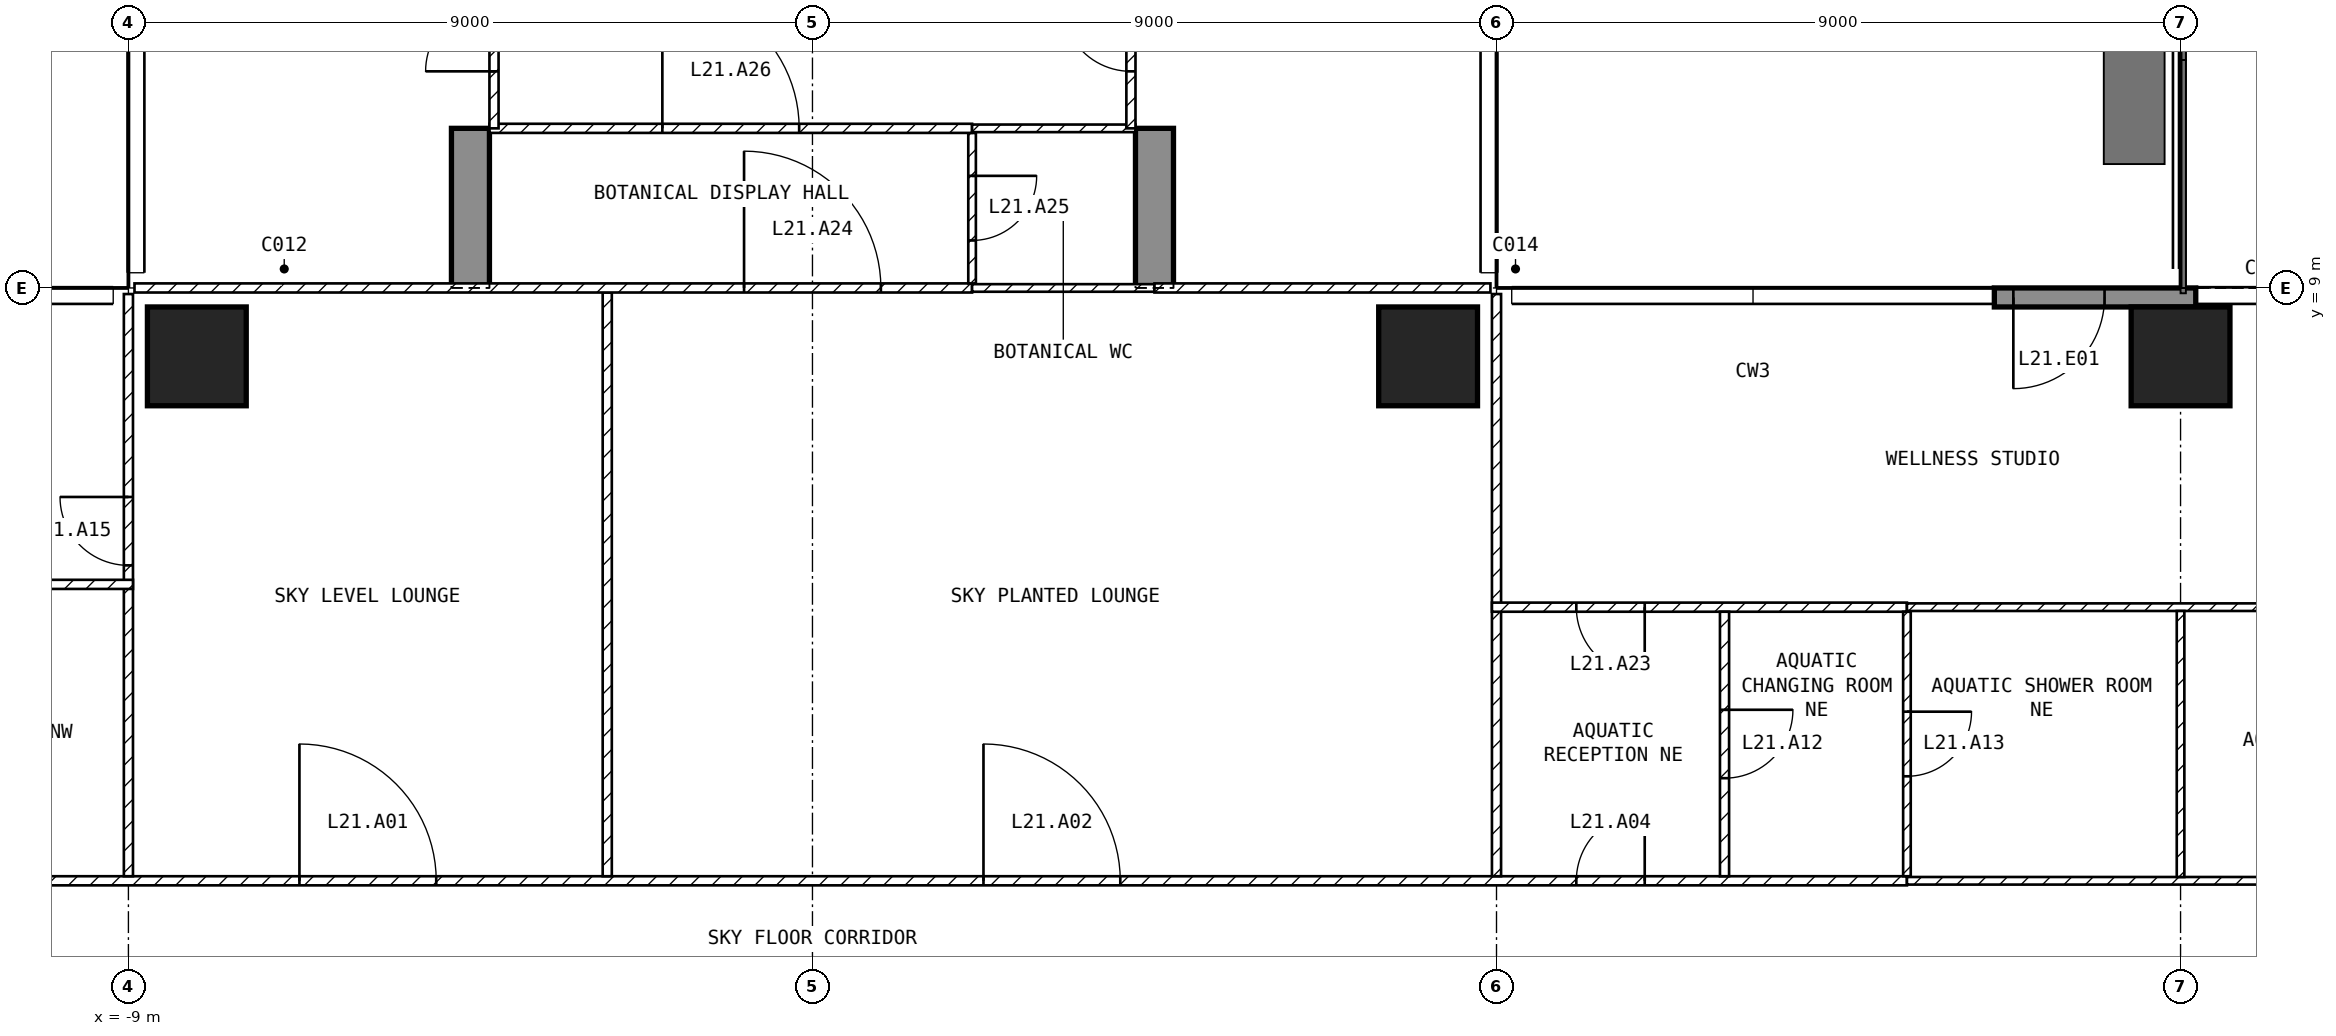
"""IFC4 building model, lengths in metres.
Left out: names, types, materials, properties, quantities, classifications, styles, units other than length and angle.
Written with IfcOpenShell. Run it as: python <this file> out.ifc"""

import sys

from ifc_helpers import new_model, si_unit, direction, frame, frame_2d, origin, origin_2d, place, context, subcontext, project, spatial, polyline, rectangle, outline, extrude, element, fill, save


model = new_model("IFC4")
c1 = context("Model", 3, precision=1e-05, world=origin(), true_north=direction((0.0, 1.0)))
c2 = subcontext(c1, "Body", "Model", "MODEL_VIEW")
j1 = project(units=[si_unit("LENGTHUNIT", "METRE"), si_unit("PLANEANGLEUNIT", "RADIAN")], contexts=[c1])
p1 = place(None, origin())
s1 = spatial("IfcSite", under=j1, at=p1, CompositionType="ELEMENT")
p2 = place(p1, origin())
s2 = spatial("IfcBuilding", under=s1, at=p2, CompositionType="ELEMENT")
p3 = place(p2, frame((0.0, 0.0, 92.5)))
s3 = spatial("IfcBuildingStorey", under=s2, at=p3, CompositionType="ELEMENT", Elevation=92.5)
for number, where, z_axis, x_axis in (
    (1, (-8.1, 8.1, -0.3), (0.0, 0.0, 1.0), (1.0, 0.0, 0.0)),
    (2, (8.1, 8.1, -0.3), (0.0, 0.0, 1.0), (1.0, 0.0, 0.0)),
    (3, (18.0, 8.1, -0.3), (0.0, 0.0, 1.0), (1.0, 0.0, 0.0)),
):
    element("IfcColumn", number, at=place(p3, frame(where, z_axis=z_axis, x_axis=x_axis)), inside=s3, PredefinedType="COLUMN", context=c2, shape_type="SweptSolid", body=[
        extrude(rectangle(XDim=1.3, YDim=1.3, at=origin_2d()), origin(), (0.0, 0.0, 1.0), 5.25),
    ])
for number, where, z_axis, x_axis in (
    (4, (-4.75, 9.0, -0.3), (1.0, 0.0, 0.0), (0.0, 1.0, 0.0)),
    (5, (4.25, 9.0, -0.3), (1.0, 0.0, 0.0), (0.0, 1.0, 0.0)),
):
    element("IfcWall", number, at=place(p3, frame(where, z_axis=z_axis, x_axis=x_axis)), inside=s3, PredefinedType="SHEAR", context=c2, shape_type="SweptSolid", body=[
        extrude(outline(polyline([(0.0, 0.0), (2.1, 0.0), (2.1, 2.7), (4.5, 2.7), (4.5, 0.0), (9.9, 0.0), (9.9, 2.7), (12.3, 2.7), (12.3, 0.0), (16.45, 0.0), (16.45, 5.25), (0.0, 5.25), (0.0, 0.0)])), origin(), (0.0, 0.0, 1.0), 0.5),
    ])
p4 = place(p3, frame((18.2, 8.875, 0.0), z_axis=(0.0, 0.0, 1.0), x_axis=(-1.0, 0.0, 0.0)))
e6 = element("IfcWall", 6, at=p4, inside=s3, PredefinedType="SOLIDWALL", context=c2, shape_type="SweptSolid", body=[
    extrude(rectangle(XDim=2.65, YDim=0.25, at=frame_2d((1.325, 0.0))), origin(), (0.0, 0.0, 1.0), 4.95),
])
p5 = place(p4, frame((1.2, 0.0, 0.0)))
e7 = element("IfcOpeningElement", 7, at=p5, cuts=e6, PredefinedType="OPENING", context=c2, shape_type="SweptSolid", body=[
    extrude(rectangle(XDim=1.2, YDim=2.4, at=frame_2d((0.6, 1.2))), frame((0.0, 0.135, 0.0), z_axis=(0.0, -1.0, 0.0), x_axis=(1.0, 0.0, 0.0)), (0.0, 0.0, 1.0), 0.27),
])
p6 = place(p3, frame((-18.3, 1.2, 0.0), z_axis=(0.0, 0.0, 1.0), x_axis=(1.0, 0.0, 0.0)))
e8 = element("IfcWall", 8, at=p6, inside=s3, PredefinedType="PARTITIONING", context=c2, shape_type="SweptSolid", body=[
    extrude(rectangle(XDim=32.7, YDim=0.12, at=frame_2d((16.35, 0.0))), origin(), (0.0, 0.0, 1.0), 4.95),
])
p7 = place(p6, frame((11.55, 0.0, 0.0)))
e9 = element("IfcOpeningElement", 9, at=p7, cuts=e8, PredefinedType="OPENING", context=c2, shape_type="SweptSolid", body=[
    extrude(rectangle(XDim=1.8, YDim=2.1, at=frame_2d((0.9, 1.05))), frame((0.0, 0.07, 0.0), z_axis=(0.0, -1.0, 0.0), x_axis=(1.0, 0.0, 0.0)), (0.0, 0.0, 1.0), 0.14),
])
p8 = place(p6, frame((20.55, 0.0, 0.0)))
e10 = element("IfcOpeningElement", 10, at=p8, cuts=e8, PredefinedType="OPENING", context=c2, shape_type="SweptSolid", body=[
    extrude(rectangle(XDim=1.8, YDim=2.1, at=frame_2d((0.9, 1.05))), frame((0.0, 0.07, 0.0), z_axis=(0.0, -1.0, 0.0), x_axis=(1.0, 0.0, 0.0)), (0.0, 0.0, 1.0), 0.14),
])
p9 = place(p6, frame((28.35, 0.0, 0.0)))
e11 = element("IfcOpeningElement", 11, at=p9, cuts=e8, PredefinedType="OPENING", context=c2, shape_type="SweptSolid", body=[
    extrude(rectangle(XDim=0.9, YDim=2.1, at=frame_2d((0.45, 1.05))), frame((0.0, 0.07, 0.0), z_axis=(0.0, -1.0, 0.0), x_axis=(1.0, 0.0, 0.0)), (0.0, 0.0, 1.0), 0.14),
])
p10 = place(p6, frame((6.9, 0.0, 0.0)))
e12 = element("IfcOpeningElement", 12, at=p10, cuts=e8, PredefinedType="OPENING", context=c2, shape_type="SweptSolid", body=[
    extrude(rectangle(XDim=0.9, YDim=2.1, at=frame_2d((0.45, 1.05))), frame((0.0, 0.07, 0.0), z_axis=(0.0, -1.0, 0.0), x_axis=(1.0, 0.0, 0.0)), (0.0, 0.0, 1.0), 0.14),
])
p11 = place(p3, frame((14.4, 1.2, 0.0), z_axis=(0.0, 0.0, 1.0), x_axis=(1.0, 0.0, 0.0)))
e13 = element("IfcWall", 13, at=p11, inside=s3, PredefinedType="PARTITIONING", context=c2, shape_type="SweptSolid", body=[
    extrude(rectangle(XDim=7.2, YDim=0.1, at=frame_2d((3.6, 0.0))), origin(), (0.0, 0.0, 1.0), 4.95),
])
p12 = place(p11, frame((4.975, 0.0, 0.0)))
e14 = element("IfcOpeningElement", 14, at=p12, cuts=e13, PredefinedType="OPENING", context=c2, shape_type="SweptSolid", body=[
    extrude(rectangle(XDim=0.85, YDim=2.1, at=frame_2d((0.425, 1.05))), frame((0.0, 0.06, 0.0), z_axis=(0.0, -1.0, 0.0), x_axis=(1.0, 0.0, 0.0)), (0.0, 0.0, 1.0), 0.12),
])
p13 = place(p3, frame((-2.7, 8.94, 0.0), z_axis=(0.0, 0.0, 1.0), x_axis=(0.0, -1.0, 0.0)))
e15 = element("IfcWall", 15, at=p13, inside=s3, PredefinedType="PARTITIONING", context=c2, shape_type="SweptSolid", body=[
    extrude(rectangle(XDim=7.68, YDim=0.12, at=frame_2d((3.84, 0.0))), origin(), (0.0, 0.0, 1.0), 4.95),
])
p14 = place(p3, frame((-9.0, 1.26, 0.0), z_axis=(0.0, 0.0, 1.0), x_axis=(0.0, 1.0, 0.0)))
e16 = element("IfcWall", 16, at=p14, inside=s3, PredefinedType="PARTITIONING", context=c2, shape_type="SweptSolid", body=[
    extrude(rectangle(XDim=7.66, YDim=0.12, at=frame_2d((3.83, 0.0))), origin(), (0.0, 0.0, 1.0), 4.95),
])
p15 = place(p14, frame((4.09, 0.0, 0.0)))
e17 = element("IfcOpeningElement", 17, at=p15, cuts=e16, PredefinedType="OPENING", context=c2, shape_type="SweptSolid", body=[
    extrude(rectangle(XDim=0.9, YDim=2.1, at=frame_2d((0.45, 1.05))), frame((0.0, 0.07, 0.0), z_axis=(0.0, -1.0, 0.0), x_axis=(1.0, 0.0, 0.0)), (0.0, 0.0, 1.0), 0.14),
])
p16 = place(p3, frame((-8.92, 9.0, 0.0), z_axis=(0.0, 0.0, 1.0), x_axis=(1.0, 0.0, 0.0)))
e18 = element("IfcWall", 18, at=p16, inside=s3, PredefinedType="PARTITIONING", context=c2, shape_type="SweptSolid", body=[
    extrude(rectangle(XDim=11.02, YDim=0.12, at=frame_2d((5.51, 0.0))), origin(), (0.0, 0.0, 1.0), 4.95),
])
p17 = place(p16, frame((8.02, 0.0, 0.0)))
e19 = element("IfcOpeningElement", 19, at=p17, cuts=e18, PredefinedType="OPENING", context=c2, shape_type="SweptSolid", body=[
    extrude(rectangle(XDim=1.8, YDim=2.1, at=frame_2d((0.9, 1.05))), frame((0.0, 0.07, 0.0), z_axis=(0.0, -1.0, 0.0), x_axis=(1.0, 0.0, 0.0)), (0.0, 0.0, 1.0), 0.14),
])
p18 = place(p3, frame((9.0, 8.92, 0.0), z_axis=(0.0, 0.0, 1.0), x_axis=(0.0, -1.0, 0.0)))
e20 = element("IfcWall", 20, at=p18, inside=s3, PredefinedType="PARTITIONING", context=c2, shape_type="SweptSolid", body=[
    extrude(rectangle(XDim=7.66, YDim=0.12, at=frame_2d((3.83, 0.0))), origin(), (0.0, 0.0, 1.0), 4.95),
])
p19 = place(p3, frame((2.1, 9.0, 0.0), z_axis=(0.0, 0.0, 1.0), x_axis=(1.0, 0.0, 0.0)))
e21 = element("IfcWall", 21, at=p19, inside=s3, PredefinedType="PARTITIONING", context=c2, shape_type="SweptSolid", body=[
    extrude(rectangle(XDim=2.4, YDim=0.1, at=frame_2d((1.2, 0.0))), origin(), (0.0, 0.0, 1.0), 4.95),
])
p20 = place(p3, frame((4.5, 9.0, 0.0), z_axis=(0.0, 0.0, 1.0), x_axis=(1.0, 0.0, 0.0)))
e22 = element("IfcWall", 22, at=p20, inside=s3, PredefinedType="PARTITIONING", context=c2, shape_type="SweptSolid", body=[
    extrude(rectangle(XDim=4.42, YDim=0.12, at=frame_2d((2.21, 0.0))), origin(), (0.0, 0.0, 1.0), 4.95),
])
p21 = place(p3, frame((14.4, 4.8, 0.0), z_axis=(0.0, 0.0, 1.0), x_axis=(-1.0, 0.0, 0.0)))
e23 = element("IfcWall", 23, at=p21, inside=s3, PredefinedType="PARTITIONING", context=c2, shape_type="SweptSolid", body=[
    extrude(rectangle(XDim=5.46, YDim=0.12, at=frame_2d((2.73, 0.0))), origin(), (0.0, 0.0, 1.0), 4.95),
])
p22 = place(p21, frame((3.45, 0.0, 0.0)))
e24 = element("IfcOpeningElement", 24, at=p22, cuts=e23, PredefinedType="OPENING", context=c2, shape_type="SweptSolid", body=[
    extrude(rectangle(XDim=0.9, YDim=2.1, at=frame_2d((0.45, 1.05))), frame((0.0, 0.07, 0.0), z_axis=(0.0, -1.0, 0.0), x_axis=(1.0, 0.0, 0.0)), (0.0, 0.0, 1.0), 0.14),
])
p23 = place(p3, frame((21.6, 4.8, 0.0), z_axis=(0.0, 0.0, 1.0), x_axis=(-1.0, 0.0, 0.0)))
e25 = element("IfcWall", 25, at=p23, inside=s3, PredefinedType="PARTITIONING", context=c2, shape_type="SweptSolid", body=[
    extrude(rectangle(XDim=7.2, YDim=0.1, at=frame_2d((3.6, 0.0))), origin(), (0.0, 0.0, 1.0), 4.95),
])
p24 = place(p3, frame((12.0, 4.74, 0.0), z_axis=(0.0, 0.0, 1.0), x_axis=(0.0, -1.0, 0.0)))
e26 = element("IfcWall", 26, at=p24, inside=s3, PredefinedType="PARTITIONING", context=c2, shape_type="SweptSolid", body=[
    extrude(rectangle(XDim=3.48, YDim=0.12, at=frame_2d((1.74, 0.0))), origin(), (0.0, 0.0, 1.0), 4.95),
])
p25 = place(p24, frame((1.29, 0.0, 0.0)))
e27 = element("IfcOpeningElement", 27, at=p25, cuts=e26, PredefinedType="OPENING", context=c2, shape_type="SweptSolid", body=[
    extrude(rectangle(XDim=0.9, YDim=2.1, at=frame_2d((0.45, 1.05))), frame((0.0, 0.07, 0.0), z_axis=(0.0, -1.0, 0.0), x_axis=(1.0, 0.0, 0.0)), (0.0, 0.0, 1.0), 0.14),
])
p26 = place(p3, frame((14.4, 4.74, 0.0), z_axis=(0.0, 0.0, 1.0), x_axis=(0.0, -1.0, 0.0)))
e28 = element("IfcWall", 28, at=p26, inside=s3, PredefinedType="PARTITIONING", context=c2, shape_type="SweptSolid", body=[
    extrude(rectangle(XDim=3.48, YDim=0.1, at=frame_2d((1.74, 0.0))), origin(), (0.0, 0.0, 1.0), 4.95),
])
p27 = place(p26, frame((1.315, 0.0, 0.0)))
e29 = element("IfcOpeningElement", 29, at=p27, cuts=e28, PredefinedType="OPENING", context=c2, shape_type="SweptSolid", body=[
    extrude(rectangle(XDim=0.85, YDim=2.1, at=frame_2d((0.425, 1.05))), frame((0.0, 0.06, 0.0), z_axis=(0.0, -1.0, 0.0), x_axis=(1.0, 0.0, 0.0)), (0.0, 0.0, 1.0), 0.12),
])
p28 = place(p3, frame((18.0, 4.75, 0.0), z_axis=(0.0, 0.0, 1.0), x_axis=(0.0, -1.0, 0.0)))
e30 = element("IfcWall", 30, at=p28, inside=s3, PredefinedType="PARTITIONING", context=c2, shape_type="SweptSolid", body=[
    extrude(rectangle(XDim=3.5, YDim=0.1, at=frame_2d((1.75, 0.0))), origin(), (0.0, 0.0, 1.0), 4.046),
])
p29 = place(p3, frame((-8.94, 5.1, 0.0), z_axis=(0.0, 0.0, 1.0), x_axis=(-1.0, 0.0, 0.0)))
e31 = element("IfcWall", 31, at=p29, inside=s3, PredefinedType="PARTITIONING", context=c2, shape_type="SweptSolid", body=[
    extrude(rectangle(XDim=9.36, YDim=0.12, at=frame_2d((4.68, 0.0))), origin(), (0.0, 0.0, 1.0), 4.95),
])
p30 = place(p3, frame((2.1, 11.04, 0.0), z_axis=(0.0, 0.0, 1.0), x_axis=(0.0, -1.0, 0.0)))
e32 = element("IfcWall", 32, at=p30, inside=s3, PredefinedType="PARTITIONING", context=c2, shape_type="SweptSolid", body=[
    extrude(rectangle(XDim=1.98, YDim=0.1, at=frame_2d((0.99, 0.0))), origin(), (0.0, 0.0, 1.0), 4.95),
])
p31 = place(p30, frame((0.565, 0.0, 0.0)))
e33 = element("IfcOpeningElement", 33, at=p31, cuts=e32, PredefinedType="OPENING", context=c2, shape_type="SweptSolid", body=[
    extrude(rectangle(XDim=0.85, YDim=2.1, at=frame_2d((0.425, 1.05))), frame((0.0, 0.06, 0.0), z_axis=(0.0, -1.0, 0.0), x_axis=(1.0, 0.0, 0.0)), (0.0, 0.0, 1.0), 0.12),
])
p32 = place(p3, frame((-4.25, 11.1, 0.0), z_axis=(0.0, 0.0, 1.0), x_axis=(1.0, 0.0, 0.0)))
e34 = element("IfcWall", 34, at=p32, inside=s3, PredefinedType="PARTITIONING", context=c2, shape_type="SweptSolid", body=[
    extrude(rectangle(XDim=6.35, YDim=0.12, at=frame_2d((3.175, 0.0))), origin(), (0.0, 0.0, 1.0), 4.95),
])
p33 = place(p32, frame((2.275, 0.0, 0.0)))
e35 = element("IfcOpeningElement", 35, at=p33, cuts=e34, PredefinedType="OPENING", context=c2, shape_type="SweptSolid", body=[
    extrude(rectangle(XDim=1.8, YDim=2.1, at=frame_2d((0.9, 1.05))), frame((0.0, 0.07, 0.0), z_axis=(0.0, -1.0, 0.0), x_axis=(1.0, 0.0, 0.0)), (0.0, 0.0, 1.0), 0.14),
])
p34 = place(p3, frame((2.1, 11.1, 0.0), z_axis=(0.0, 0.0, 1.0), x_axis=(1.0, 0.0, 0.0)))
e36 = element("IfcWall", 36, at=p34, inside=s3, PredefinedType="PARTITIONING", context=c2, shape_type="SweptSolid", body=[
    extrude(rectangle(XDim=2.15, YDim=0.1, at=frame_2d((1.075, 0.0))), origin(), (0.0, 0.0, 1.0), 4.95),
])
p35 = place(p3, frame((4.19, 11.1, 0.0), z_axis=(0.0, 0.0, 1.0), x_axis=(0.0, 1.0, 0.0)))
e37 = element("IfcWall", 37, at=p35, inside=s3, PredefinedType="PARTITIONING", context=c2, shape_type="SweptSolid", body=[
    extrude(rectangle(XDim=2.4, YDim=0.12, at=frame_2d((1.2, 0.0))), origin(), (0.0, 0.0, 1.0), 2.4),
])
p36 = place(p35, frame((0.75, 0.0, 0.0)))
e38 = element("IfcOpeningElement", 38, at=p36, cuts=e37, PredefinedType="OPENING", context=c2, shape_type="SweptSolid", body=[
    extrude(rectangle(XDim=0.9, YDim=2.1, at=frame_2d((0.45, 1.05))), frame((0.0, 0.07, 0.0), z_axis=(0.0, -1.0, 0.0), x_axis=(1.0, 0.0, 0.0)), (0.0, 0.0, 1.0), 0.14),
])
p37 = place(p3, frame((-4.19, 11.1, 0.0), z_axis=(0.0, 0.0, 1.0), x_axis=(0.0, 1.0, 0.0)))
e39 = element("IfcWall", 39, at=p37, inside=s3, PredefinedType="PARTITIONING", context=c2, shape_type="SweptSolid", body=[
    extrude(rectangle(XDim=2.4, YDim=0.12, at=frame_2d((1.2, 0.0))), origin(), (0.0, 0.0, 1.0), 2.4),
])
p38 = place(p37, frame((0.75, 0.0, 0.0)))
e40 = element("IfcOpeningElement", 40, at=p38, cuts=e39, PredefinedType="OPENING", context=c2, shape_type="SweptSolid", body=[
    extrude(rectangle(XDim=0.9, YDim=2.1, at=frame_2d((0.45, 1.05))), frame((0.0, 0.07, 0.0), z_axis=(0.0, -1.0, 0.0), x_axis=(1.0, 0.0, 0.0)), (0.0, 0.0, 1.0), 0.14),
])
p39 = place(p5, origin())
e41 = element("IfcDoor", 41, at=p39, inside=s3, OperationType="SINGLE_SWING_RIGHT", PredefinedType="DOOR", context=c2, shape_type="SweptSolid", body=[
    extrude(rectangle(XDim=1.2, YDim=2.4, at=frame_2d((0.6, 1.2))), frame((0.0, 0.025, 0.0), z_axis=(0.0, -1.0, 0.0), x_axis=(1.0, 0.0, 0.0)), (0.0, 0.0, 1.0), 0.05),
])
fill(e7, e41)
p40 = place(p7, origin())
e42 = element("IfcDoor", 42, at=p40, inside=s3, OperationType="SINGLE_SWING_LEFT", PredefinedType="DOOR", context=c2, shape_type="SweptSolid", body=[
    extrude(rectangle(XDim=1.8, YDim=2.1, at=frame_2d((0.9, 1.05))), frame((0.0, 0.025, 0.0), z_axis=(0.0, -1.0, 0.0), x_axis=(1.0, 0.0, 0.0)), (0.0, 0.0, 1.0), 0.05),
])
fill(e9, e42)
p41 = place(p8, origin())
e43 = element("IfcDoor", 43, at=p41, inside=s3, OperationType="SINGLE_SWING_LEFT", PredefinedType="DOOR", context=c2, shape_type="SweptSolid", body=[
    extrude(rectangle(XDim=1.8, YDim=2.1, at=frame_2d((0.9, 1.05))), frame((0.0, 0.025, 0.0), z_axis=(0.0, -1.0, 0.0), x_axis=(1.0, 0.0, 0.0)), (0.0, 0.0, 1.0), 0.05),
])
fill(e10, e43)
p42 = place(p9, origin())
e44 = element("IfcDoor", 44, at=p42, inside=s3, OperationType="SINGLE_SWING_RIGHT", PredefinedType="DOOR", context=c2, shape_type="SweptSolid", body=[
    extrude(rectangle(XDim=0.9, YDim=2.1, at=frame_2d((0.45, 1.05))), frame((0.0, 0.025, 0.0), z_axis=(0.0, -1.0, 0.0), x_axis=(1.0, 0.0, 0.0)), (0.0, 0.0, 1.0), 0.05),
])
fill(e11, e44)
p43 = place(p25, origin())
e45 = element("IfcDoor", 45, at=p43, inside=s3, OperationType="SINGLE_SWING_LEFT", PredefinedType="DOOR", context=c2, shape_type="SweptSolid", body=[
    extrude(rectangle(XDim=0.9, YDim=2.1, at=frame_2d((0.45, 1.05))), frame((0.0, 0.025, 0.0), z_axis=(0.0, -1.0, 0.0), x_axis=(1.0, 0.0, 0.0)), (0.0, 0.0, 1.0), 0.05),
])
fill(e27, e45)
p44 = place(p27, origin())
e46 = element("IfcDoor", 46, at=p44, inside=s3, OperationType="SINGLE_SWING_LEFT", PredefinedType="DOOR", context=c2, shape_type="SweptSolid", body=[
    extrude(rectangle(XDim=0.85, YDim=2.1, at=frame_2d((0.425, 1.05))), frame((0.0, 0.025, 0.0), z_axis=(0.0, -1.0, 0.0), x_axis=(1.0, 0.0, 0.0)), (0.0, 0.0, 1.0), 0.05),
])
fill(e29, e46)
p45 = place(p15, origin())
e47 = element("IfcDoor", 47, at=p45, inside=s3, OperationType="SINGLE_SWING_RIGHT", PredefinedType="DOOR", context=c2, shape_type="SweptSolid", body=[
    extrude(rectangle(XDim=0.9, YDim=2.1, at=frame_2d((0.45, 1.05))), frame((0.0, 0.025, 0.0), z_axis=(0.0, -1.0, 0.0), x_axis=(1.0, 0.0, 0.0)), (0.0, 0.0, 1.0), 0.05),
])
fill(e17, e47)
p46 = place(p22, origin())
e48 = element("IfcDoor", 48, at=p46, inside=s3, OperationType="SINGLE_SWING_LEFT", PredefinedType="DOOR", context=c2, shape_type="SweptSolid", body=[
    extrude(rectangle(XDim=0.9, YDim=2.1, at=frame_2d((0.45, 1.05))), frame((0.0, 0.025, 0.0), z_axis=(0.0, -1.0, 0.0), x_axis=(1.0, 0.0, 0.0)), (0.0, 0.0, 1.0), 0.05),
])
fill(e24, e48)
p47 = place(p17, origin())
e49 = element("IfcDoor", 49, at=p47, inside=s3, OperationType="SINGLE_SWING_LEFT", PredefinedType="DOOR", context=c2, shape_type="SweptSolid", body=[
    extrude(rectangle(XDim=1.8, YDim=2.1, at=frame_2d((0.9, 1.05))), frame((0.0, 0.025, 0.0), z_axis=(0.0, -1.0, 0.0), x_axis=(1.0, 0.0, 0.0)), (0.0, 0.0, 1.0), 0.05),
])
fill(e19, e49)
p48 = place(p31, origin())
e50 = element("IfcDoor", 50, at=p48, inside=s3, OperationType="SINGLE_SWING_LEFT", PredefinedType="DOOR", context=c2, shape_type="SweptSolid", body=[
    extrude(rectangle(XDim=0.85, YDim=2.1, at=frame_2d((0.425, 1.05))), frame((0.0, 0.025, 0.0), z_axis=(0.0, -1.0, 0.0), x_axis=(1.0, 0.0, 0.0)), (0.0, 0.0, 1.0), 0.05),
])
fill(e33, e50)
p49 = place(p33, origin())
e51 = element("IfcDoor", 51, at=p49, inside=s3, OperationType="SINGLE_SWING_LEFT", PredefinedType="DOOR", context=c2, shape_type="SweptSolid", body=[
    extrude(rectangle(XDim=1.8, YDim=2.1, at=frame_2d((0.9, 1.05))), frame((0.0, 0.025, 0.0), z_axis=(0.0, -1.0, 0.0), x_axis=(1.0, 0.0, 0.0)), (0.0, 0.0, 1.0), 0.05),
])
fill(e35, e51)
p50 = place(p36, origin())
e52 = element("IfcDoor", 52, at=p50, inside=s3, OperationType="SINGLE_SWING_RIGHT", PredefinedType="DOOR", context=c2, shape_type="SweptSolid", body=[
    extrude(rectangle(XDim=0.9, YDim=2.1, at=frame_2d((0.45, 1.05))), frame((0.0, 0.025, 0.0), z_axis=(0.0, -1.0, 0.0), x_axis=(1.0, 0.0, 0.0)), (0.0, 0.0, 1.0), 0.05),
])
fill(e38, e52)
p51 = place(p38, origin())
e53 = element("IfcDoor", 53, at=p51, inside=s3, OperationType="SINGLE_SWING_LEFT", PredefinedType="DOOR", context=c2, shape_type="SweptSolid", body=[
    extrude(rectangle(XDim=0.9, YDim=2.1, at=frame_2d((0.45, 1.05))), frame((0.0, 0.025, 0.0), z_axis=(0.0, -1.0, 0.0), x_axis=(1.0, 0.0, 0.0)), (0.0, 0.0, 1.0), 0.05),
])
fill(e40, e53)
save(model, sys.argv[1])
